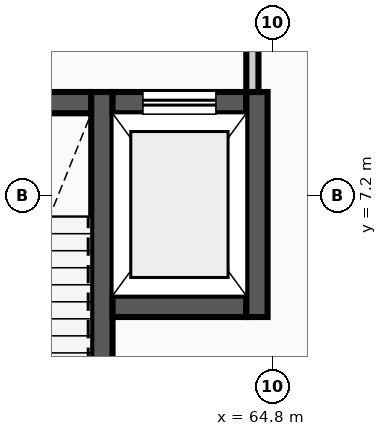
"""IFC4 building model, lengths in metres.
Left out: names, types, materials, properties, quantities, classifications, styles, units other than length and angle.
Written with IfcOpenShell. Run it as: python <this file> out.ifc"""

import sys

from ifc_helpers import new_model, si_unit, direction, frame, frame_2d, origin, place, context, subcontext, project, spatial, rectangle, extrude, element, fill, save


model = new_model("IFC4")
c1 = context("Model", 3, precision=1e-05, world=origin(), true_north=direction((0.0, 1.0)))
c2 = subcontext(c1, "Body", "Model", "MODEL_VIEW")
j1 = project(units=[si_unit("LENGTHUNIT", "METRE"), si_unit("PLANEANGLEUNIT", "RADIAN")], contexts=[c1])
p1 = place(None, origin())
s1 = spatial("IfcSite", under=j1, at=p1, CompositionType="ELEMENT")
p2 = place(p1, origin())
s2 = spatial("IfcBuilding", under=s1, at=p2, CompositionType="ELEMENT")
p3 = place(p2, frame((0.0, 0.0, 14.0)))
s3 = spatial("IfcBuildingStorey", under=s2, at=p3, CompositionType="ELEMENT", Elevation=14.0)
p4 = place(p3, frame((58.67, 8.725, 0.0), z_axis=(0.0, 0.0, 1.0), x_axis=(1.0, 0.0, 0.0)))
e1 = element("IfcWall", 1, at=p4, inside=s3, PredefinedType="SHEAR", context=c2, shape_type="SweptSolid", body=[
    extrude(rectangle(XDim=3.15, YDim=0.35, at=frame_2d((1.575, 0.0))), origin(), (0.0, 0.0, 1.0), 4.2),
])
p5 = place(p4, frame((1.025, 0.0, 0.0)))
e2 = element("IfcOpeningElement", 2, at=p5, cuts=e1, PredefinedType="OPENING", context=c2, shape_type="SweptSolid", body=[
    extrude(rectangle(XDim=1.1, YDim=2.15, at=frame_2d((0.55, 1.075))), frame((0.0, 0.185, 0.0), z_axis=(0.0, -1.0, 0.0), x_axis=(1.0, 0.0, 0.0)), (0.0, 0.0, 1.0), 0.37),
])
p6 = place(p3, frame((61.995, 0.4, 0.0), z_axis=(0.0, 0.0, 1.0), x_axis=(0.0, 1.0, 0.0)))
e3 = element("IfcWall", 3, at=p6, inside=s3, PredefinedType="SHEAR", context=c2, shape_type="SweptSolid", body=[
    extrude(rectangle(XDim=8.5, YDim=0.35, at=frame_2d((4.25, 0.0))), origin(), (0.0, 0.0, 1.0), 4.2),
])
p7 = place(p3, frame((62.17, 5.375, 0.0), z_axis=(0.0, 0.0, 1.0), x_axis=(1.0, 0.0, 0.0)))
e4 = element("IfcWall", 4, at=p7, inside=s3, PredefinedType="SHEAR", context=c2, shape_type="SweptSolid", body=[
    extrude(rectangle(XDim=2.2, YDim=0.35, at=frame_2d((1.1, 0.0))), origin(), (0.0, 0.0, 1.0), 4.2),
])
p8 = place(p3, frame((62.17, 8.725, 0.0), z_axis=(0.0, 0.0, 1.0), x_axis=(1.0, 0.0, 0.0)))
e5 = element("IfcWall", 5, at=p8, inside=s3, PredefinedType="SHEAR", context=c2, shape_type="SweptSolid", body=[
    extrude(rectangle(XDim=2.2, YDim=0.35, at=frame_2d((1.1, 0.0))), origin(), (0.0, 0.0, 1.0), 4.2),
])
p9 = place(p8, frame((0.5, 0.0, 0.0)))
e6 = element("IfcOpeningElement", 6, at=p9, cuts=e5, PredefinedType="OPENING", context=c2, shape_type="SweptSolid", body=[
    extrude(rectangle(XDim=1.2, YDim=2.2, at=frame_2d((0.6, 1.1))), frame((0.0, 0.185, 0.0), z_axis=(0.0, -1.0, 0.0), x_axis=(1.0, 0.0, 0.0)), (0.0, 0.0, 1.0), 0.37),
])
p10 = place(p3, frame((64.545, 5.2, 0.0), z_axis=(0.0, 0.0, 1.0), x_axis=(0.0, 1.0, 0.0)))
e7 = element("IfcWall", 7, at=p10, inside=s3, PredefinedType="SHEAR", context=c2, shape_type="SweptSolid", body=[
    extrude(rectangle(XDim=3.7, YDim=0.35, at=frame_2d((1.85, 0.0))), origin(), (0.0, 0.0, 1.0), 4.2),
])
p11 = place(p3, frame((64.47, 8.9, 0.0), z_axis=(0.0, 0.0, 1.0), x_axis=(0.0, 1.0, 0.0)))
e8 = element("IfcWall", 8, at=p11, inside=s3, PredefinedType="PARTITIONING", context=c2, shape_type="SweptSolid", body=[
    extrude(rectangle(XDim=2.45, YDim=0.2, at=frame_2d((1.225, 0.0))), origin(), (0.0, 0.0, 1.0), 4.2),
])
p12 = place(p9, origin())
e9 = element("IfcDoor", 9, at=p12, inside=s3, OperationType="SLIDING_TO_RIGHT", PredefinedType="DOOR", context=c2, shape_type="SweptSolid", body=[
    extrude(rectangle(XDim=1.2, YDim=2.2, at=frame_2d((0.6, 1.1))), frame((0.0, 0.025, 0.0), z_axis=(0.0, -1.0, 0.0), x_axis=(1.0, 0.0, 0.0)), (0.0, 0.0, 1.0), 0.05),
])
fill(e6, e9)
save(model, sys.argv[1])
